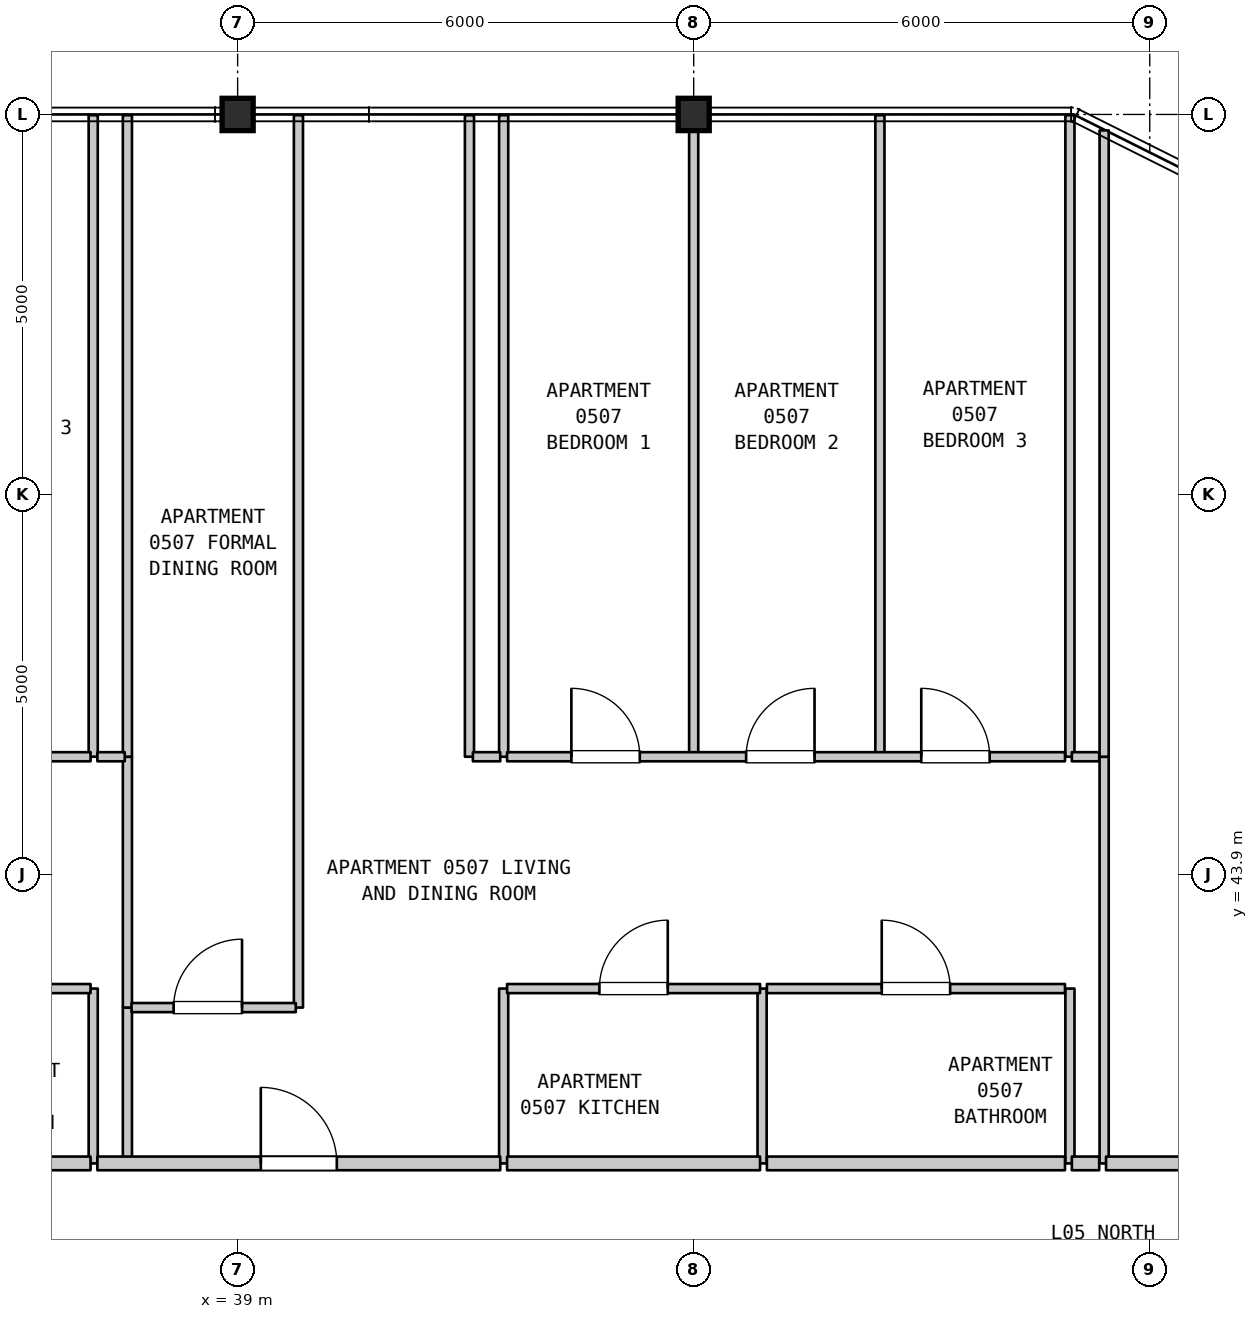
"""IFC4 building model, lengths in metres.
Left out: names, types, materials, properties, quantities, classifications, styles, units other than length and angle.
Written with IfcOpenShell. Run it as: python <this file> out.ifc"""

import sys

from ifc_helpers import new_model, si_unit, direction, frame, frame_2d, origin, origin_2d, place, context, subcontext, project, spatial, rectangle, i_section, extrude, element, fill, save


model = new_model("IFC4")
c1 = context("Model", 3, precision=1e-05, world=origin(), true_north=direction((0.0, 1.0)))
c2 = subcontext(c1, "Body", "Model", "MODEL_VIEW")
j1 = project(units=[si_unit("LENGTHUNIT", "METRE"), si_unit("PLANEANGLEUNIT", "RADIAN")], contexts=[c1])
p1 = place(None, origin())
s1 = spatial("IfcSite", under=j1, at=p1, CompositionType="ELEMENT")
p2 = place(p1, origin())
s2 = spatial("IfcBuilding", under=s1, at=p2, CompositionType="ELEMENT")
p3 = place(p2, frame((0.0, 0.0, 27.7)))
s3 = spatial("IfcBuildingStorey", under=s2, at=p3, CompositionType="ELEMENT", Elevation=27.7)
for number, where, z_axis, x_axis in (
    (1, (39.0, 53.9, 0.0), (0.0, 0.0, 1.0), (1.0, 0.0, 0.0)),
    (2, (45.0, 53.9, 0.0), (0.0, 0.0, 1.0), (1.0, 0.0, 0.0)),
):
    element("IfcColumn", number, at=place(p3, frame(where, z_axis=z_axis, x_axis=x_axis)), inside=s3, PredefinedType="COLUMN", context=c2, shape_type="SweptSolid", body=[
        extrude(i_section(OverallWidth=0.409, OverallDepth=0.425, WebThickness=0.032, FlangeThickness=0.052, FilletRadius=0.015, at=origin_2d()), origin(), (0.0, 0.0, 1.0), 3.7),
    ])
p4 = place(p3, frame((37.1, 40.1, 0.0), z_axis=(0.0, 0.0, 1.0), x_axis=(0.0, 1.0, 0.0)))
e3 = element("IfcWall", 3, at=p4, inside=s3, PredefinedType="PARTITIONING", context=c2, shape_type="SweptSolid", body=[
    extrude(rectangle(XDim=2.3, YDim=0.12, at=frame_2d((1.15, 0.0))), origin(), (0.0, 0.0, 1.0), 3.385),
])
p5 = place(p3, frame((37.1, 45.45, 0.0), z_axis=(0.0, 0.0, 1.0), x_axis=(0.0, 1.0, 0.0)))
e4 = element("IfcWall", 4, at=p5, inside=s3, PredefinedType="PARTITIONING", context=c2, shape_type="SweptSolid", body=[
    extrude(rectangle(XDim=8.44, YDim=0.12, at=frame_2d((4.22, 0.0))), origin(), (0.0, 0.0, 1.0), 3.385),
])
p6 = place(p3, frame((37.55, 40.1, 0.0), z_axis=(0.0, 0.0, 1.0), x_axis=(0.0, 1.0, 0.0)))
e5 = element("IfcWall", 5, at=p6, inside=s3, PredefinedType="PARTITIONING", context=c2, shape_type="SweptSolid", body=[
    extrude(rectangle(XDim=2.05, YDim=0.12, at=frame_2d((1.025, 0.0))), origin(), (0.0, 0.0, 1.0), 3.385),
])
p7 = place(p3, frame((37.55, 42.15, 0.0), z_axis=(0.0, 0.0, 1.0), x_axis=(0.0, 1.0, 0.0)))
e6 = element("IfcWall", 6, at=p7, inside=s3, PredefinedType="PARTITIONING", context=c2, shape_type="SweptSolid", body=[
    extrude(rectangle(XDim=3.3, YDim=0.12, at=frame_2d((1.65, 0.0))), origin(), (0.0, 0.0, 1.0), 3.385),
])
p8 = place(p3, frame((37.55, 45.45, 0.0), z_axis=(0.0, 0.0, 1.0), x_axis=(0.0, 1.0, 0.0)))
e7 = element("IfcWall", 7, at=p8, inside=s3, PredefinedType="PARTITIONING", context=c2, shape_type="SweptSolid", body=[
    extrude(rectangle(XDim=8.44, YDim=0.12, at=frame_2d((4.22, 0.0))), origin(), (0.0, 0.0, 1.0), 3.385),
])
p9 = place(p3, frame((39.8, 42.15, 0.0), z_axis=(0.0, 0.0, 1.0), x_axis=(0.0, 1.0, 0.0)))
e8 = element("IfcWall", 8, at=p9, inside=s3, PredefinedType="PARTITIONING", context=c2, shape_type="SweptSolid", body=[
    extrude(rectangle(XDim=11.74, YDim=0.12, at=frame_2d((5.87, 0.0))), origin(), (0.0, 0.0, 1.0), 3.385),
])
p10 = place(p3, frame((42.05, 45.45, 0.0), z_axis=(0.0, 0.0, 1.0), x_axis=(0.0, 1.0, 0.0)))
e9 = element("IfcWall", 9, at=p10, inside=s3, PredefinedType="PARTITIONING", context=c2, shape_type="SweptSolid", body=[
    extrude(rectangle(XDim=8.44, YDim=0.12, at=frame_2d((4.22, 0.0))), origin(), (0.0, 0.0, 1.0), 3.385),
])
p11 = place(p3, frame((42.5, 40.1, 0.0), z_axis=(0.0, 0.0, 1.0), x_axis=(0.0, 1.0, 0.0)))
e10 = element("IfcWall", 10, at=p11, inside=s3, PredefinedType="PARTITIONING", context=c2, shape_type="SweptSolid", body=[
    extrude(rectangle(XDim=2.3, YDim=0.12, at=frame_2d((1.15, 0.0))), origin(), (0.0, 0.0, 1.0), 3.385),
])
for number, where, z_axis, x_axis in (
    (11, (42.5, 45.45, 0.0), (0.0, 0.0, 1.0), (0.0, 1.0, 0.0)),
    (12, (45.0, 45.45, 0.0), (0.0, 0.0, 1.0), (0.0, 1.0, 0.0)),
):
    element("IfcWall", number, at=place(p3, frame(where, z_axis=z_axis, x_axis=x_axis)), inside=s3, PredefinedType="PARTITIONING", context=c2, shape_type="SweptSolid", body=[
        extrude(rectangle(XDim=8.44, YDim=0.12, at=frame_2d((4.22, 0.0))), origin(), (0.0, 0.0, 1.0), 3.385),
    ])
p12 = place(p3, frame((45.9, 40.1, 0.0), z_axis=(0.0, 0.0, 1.0), x_axis=(0.0, 1.0, 0.0)))
e13 = element("IfcWall", 13, at=p12, inside=s3, PredefinedType="PARTITIONING", context=c2, shape_type="SweptSolid", body=[
    extrude(rectangle(XDim=2.3, YDim=0.12, at=frame_2d((1.15, 0.0))), origin(), (0.0, 0.0, 1.0), 3.385),
])
p13 = place(p3, frame((47.45, 45.45, 0.0), z_axis=(0.0, 0.0, 1.0), x_axis=(0.0, 1.0, 0.0)))
e14 = element("IfcWall", 14, at=p13, inside=s3, PredefinedType="PARTITIONING", context=c2, shape_type="SweptSolid", body=[
    extrude(rectangle(XDim=8.44, YDim=0.12, at=frame_2d((4.22, 0.0))), origin(), (0.0, 0.0, 1.0), 3.385),
])
p14 = place(p3, frame((49.95, 40.1, 0.0), z_axis=(0.0, 0.0, 1.0), x_axis=(0.0, 1.0, 0.0)))
e15 = element("IfcWall", 15, at=p14, inside=s3, PredefinedType="PARTITIONING", context=c2, shape_type="SweptSolid", body=[
    extrude(rectangle(XDim=2.3, YDim=0.12, at=frame_2d((1.15, 0.0))), origin(), (0.0, 0.0, 1.0), 3.385),
])
p15 = place(p3, frame((49.95, 45.45, 0.0), z_axis=(0.0, 0.0, 1.0), x_axis=(0.0, 1.0, 0.0)))
e16 = element("IfcWall", 16, at=p15, inside=s3, PredefinedType="PARTITIONING", context=c2, shape_type="SweptSolid", body=[
    extrude(rectangle(XDim=8.44, YDim=0.12, at=frame_2d((4.22, 0.0))), origin(), (0.0, 0.0, 1.0), 3.385),
])
p16 = place(p3, frame((50.4, 40.1, 0.0), z_axis=(0.0, 0.0, 1.0), x_axis=(0.0, 1.0, 0.0)))
e17 = element("IfcWall", 17, at=p16, inside=s3, PredefinedType="PARTITIONING", context=c2, shape_type="SweptSolid", body=[
    extrude(rectangle(XDim=5.35, YDim=0.12, at=frame_2d((2.675, 0.0))), origin(), (0.0, 0.0, 1.0), 3.385),
])
p17 = place(p3, frame((50.4, 45.45, 0.0), z_axis=(0.0, 0.0, 1.0), x_axis=(0.0, 1.0, 0.0)))
e18 = element("IfcWall", 18, at=p17, inside=s3, PredefinedType="PARTITIONING", context=c2, shape_type="SweptSolid", body=[
    extrude(rectangle(XDim=8.24, YDim=0.12, at=frame_2d((4.12, 0.0))), origin(), (0.0, 0.0, 1.0), 3.385),
])
p18 = place(p3, frame((34.873, 40.1, 0.0), z_axis=(0.0, 0.0, 1.0), x_axis=(1.0, 0.0, 0.0)))
e19 = element("IfcWall", 19, at=p18, inside=s3, PredefinedType="STANDARD", context=c2, shape_type="SweptSolid", body=[
    extrude(rectangle(XDim=2.192, YDim=0.18, at=frame_2d((1.096, 0.0))), origin(), (0.0, 0.0, 1.0), 3.385),
])
p19 = place(p3, frame((37.155, 40.1, 0.0), z_axis=(0.0, 0.0, 1.0), x_axis=(1.0, 0.0, 0.0)))
e20 = element("IfcWall", 20, at=p19, inside=s3, PredefinedType="STANDARD", context=c2, shape_type="SweptSolid", body=[
    extrude(rectangle(XDim=5.3, YDim=0.18, at=frame_2d((2.65, 0.0))), origin(), (0.0, 0.0, 1.0), 3.385),
])
p20 = place(p19, frame((2.15, 0.0, 0.0)))
e21 = element("IfcOpeningElement", 21, at=p20, cuts=e20, PredefinedType="OPENING", context=c2, shape_type="SweptSolid", body=[
    extrude(rectangle(XDim=1.0, YDim=2.15, at=frame_2d((0.5, 1.075))), frame((0.0, 0.1, 0.0), z_axis=(0.0, -1.0, 0.0), x_axis=(1.0, 0.0, 0.0)), (0.0, 0.0, 1.0), 0.2),
])
p21 = place(p3, frame((42.545, 40.1, 0.0), z_axis=(0.0, 0.0, 1.0), x_axis=(1.0, 0.0, 0.0)))
e22 = element("IfcWall", 22, at=p21, inside=s3, PredefinedType="STANDARD", context=c2, shape_type="SweptSolid", body=[
    extrude(rectangle(XDim=3.328, YDim=0.18, at=frame_2d((1.664, 0.0))), origin(), (0.0, 0.0, 1.0), 3.385),
])
p22 = place(p3, frame((45.963, 40.1, 0.0), z_axis=(0.0, 0.0, 1.0), x_axis=(1.0, 0.0, 0.0)))
e23 = element("IfcWall", 23, at=p22, inside=s3, PredefinedType="STANDARD", context=c2, shape_type="SweptSolid", body=[
    extrude(rectangle(XDim=3.922, YDim=0.18, at=frame_2d((1.961, 0.0))), origin(), (0.0, 0.0, 1.0), 3.385),
])
p23 = place(p3, frame((49.975, 40.1, 0.0), z_axis=(0.0, 0.0, 1.0), x_axis=(1.0, 0.0, 0.0)))
e24 = element("IfcWall", 24, at=p23, inside=s3, PredefinedType="STANDARD", context=c2, shape_type="SweptSolid", body=[
    extrude(rectangle(XDim=0.36, YDim=0.18, at=frame_2d((0.18, 0.0))), origin(), (0.0, 0.0, 1.0), 3.385),
])
p24 = place(p3, frame((50.425, 40.1, 0.0), z_axis=(0.0, 0.0, 1.0), x_axis=(1.0, 0.0, 0.0)))
e25 = element("IfcWall", 25, at=p24, inside=s3, PredefinedType="STANDARD", context=c2, shape_type="SweptSolid", body=[
    extrude(rectangle(XDim=4.03, YDim=0.18, at=frame_2d((2.015, 0.0))), origin(), (0.0, 0.0, 1.0), 3.385),
])
p25 = place(p24, frame((1.515, 0.0, 0.0)))
e26 = element("IfcOpeningElement", 26, at=p25, cuts=e25, PredefinedType="OPENING", context=c2, shape_type="SweptSolid", body=[
    extrude(rectangle(XDim=1.0, YDim=2.15, at=frame_2d((0.5, 1.075))), frame((0.0, 0.1, 0.0), z_axis=(0.0, -1.0, 0.0), x_axis=(1.0, 0.0, 0.0)), (0.0, 0.0, 1.0), 0.2),
])
p26 = place(p3, frame((37.605, 42.15, 0.0), z_axis=(0.0, 0.0, 1.0), x_axis=(1.0, 0.0, 0.0)))
e27 = element("IfcWall", 27, at=p26, inside=s3, PredefinedType="PARTITIONING", context=c2, shape_type="SweptSolid", body=[
    extrude(rectangle(XDim=2.16, YDim=0.12, at=frame_2d((1.08, 0.0))), origin(), (0.0, 0.0, 1.0), 3.385),
])
p27 = place(p26, frame((0.553, 0.0, 0.0)))
e28 = element("IfcOpeningElement", 28, at=p27, cuts=e27, PredefinedType="OPENING", context=c2, shape_type="SweptSolid", body=[
    extrude(rectangle(XDim=0.9, YDim=2.15, at=frame_2d((0.45, 1.075))), frame((0.0, 0.07, 0.0), z_axis=(0.0, -1.0, 0.0), x_axis=(1.0, 0.0, 0.0)), (0.0, 0.0, 1.0), 0.14),
])
p28 = place(p3, frame((34.873, 42.4, 0.0), z_axis=(0.0, 0.0, 1.0), x_axis=(1.0, 0.0, 0.0)))
e29 = element("IfcWall", 29, at=p28, inside=s3, PredefinedType="PARTITIONING", context=c2, shape_type="SweptSolid", body=[
    extrude(rectangle(XDim=2.192, YDim=0.12, at=frame_2d((1.096, 0.0))), origin(), (0.0, 0.0, 1.0), 3.385),
])
p29 = place(p28, frame((0.646, 0.0, 0.0)))
e30 = element("IfcOpeningElement", 30, at=p29, cuts=e29, PredefinedType="OPENING", context=c2, shape_type="SweptSolid", body=[
    extrude(rectangle(XDim=0.9, YDim=2.1, at=frame_2d((0.45, 1.05))), frame((0.0, 0.07, 0.0), z_axis=(0.0, -1.0, 0.0), x_axis=(1.0, 0.0, 0.0)), (0.0, 0.0, 1.0), 0.14),
])
p30 = place(p3, frame((42.545, 42.4, 0.0), z_axis=(0.0, 0.0, 1.0), x_axis=(1.0, 0.0, 0.0)))
e31 = element("IfcWall", 31, at=p30, inside=s3, PredefinedType="PARTITIONING", context=c2, shape_type="SweptSolid", body=[
    extrude(rectangle(XDim=3.328, YDim=0.12, at=frame_2d((1.664, 0.0))), origin(), (0.0, 0.0, 1.0), 3.385),
])
p31 = place(p30, frame((1.214, 0.0, 0.0)))
e32 = element("IfcOpeningElement", 32, at=p31, cuts=e31, PredefinedType="OPENING", context=c2, shape_type="SweptSolid", body=[
    extrude(rectangle(XDim=0.9, YDim=2.15, at=frame_2d((0.45, 1.075))), frame((0.0, 0.07, 0.0), z_axis=(0.0, -1.0, 0.0), x_axis=(1.0, 0.0, 0.0)), (0.0, 0.0, 1.0), 0.14),
])
p32 = place(p3, frame((45.963, 42.4, 0.0), z_axis=(0.0, 0.0, 1.0), x_axis=(1.0, 0.0, 0.0)))
e33 = element("IfcWall", 33, at=p32, inside=s3, PredefinedType="PARTITIONING", context=c2, shape_type="SweptSolid", body=[
    extrude(rectangle(XDim=3.922, YDim=0.12, at=frame_2d((1.961, 0.0))), origin(), (0.0, 0.0, 1.0), 3.385),
])
p33 = place(p32, frame((1.511, 0.0, 0.0)))
e34 = element("IfcOpeningElement", 34, at=p33, cuts=e33, PredefinedType="OPENING", context=c2, shape_type="SweptSolid", body=[
    extrude(rectangle(XDim=0.9, YDim=2.1, at=frame_2d((0.45, 1.05))), frame((0.0, 0.07, 0.0), z_axis=(0.0, -1.0, 0.0), x_axis=(1.0, 0.0, 0.0)), (0.0, 0.0, 1.0), 0.14),
])
p34 = place(p3, frame((29.005, 45.45, 0.0), z_axis=(0.0, 0.0, 1.0), x_axis=(1.0, 0.0, 0.0)))
e35 = element("IfcWall", 35, at=p34, inside=s3, PredefinedType="PARTITIONING", context=c2, shape_type="SweptSolid", body=[
    extrude(rectangle(XDim=8.06, YDim=0.12, at=frame_2d((4.03, 0.0))), origin(), (0.0, 0.0, 1.0), 3.385),
])
p35 = place(p34, frame((0.968, 0.0, 0.0)))
e36 = element("IfcOpeningElement", 36, at=p35, cuts=e35, PredefinedType="OPENING", context=c2, shape_type="SweptSolid", body=[
    extrude(rectangle(XDim=0.9, YDim=2.15, at=frame_2d((0.45, 1.075))), frame((0.0, 0.07, 0.0), z_axis=(0.0, -1.0, 0.0), x_axis=(1.0, 0.0, 0.0)), (0.0, 0.0, 1.0), 0.14),
])
p36 = place(p34, frame((3.507, 0.0, 0.0)))
e37 = element("IfcOpeningElement", 37, at=p36, cuts=e35, PredefinedType="OPENING", context=c2, shape_type="SweptSolid", body=[
    extrude(rectangle(XDim=0.9, YDim=2.15, at=frame_2d((0.45, 1.075))), frame((0.0, 0.07, 0.0), z_axis=(0.0, -1.0, 0.0), x_axis=(1.0, 0.0, 0.0)), (0.0, 0.0, 1.0), 0.14),
])
p37 = place(p34, frame((6.051, 0.0, 0.0)))
e38 = element("IfcOpeningElement", 38, at=p37, cuts=e35, PredefinedType="OPENING", context=c2, shape_type="SweptSolid", body=[
    extrude(rectangle(XDim=0.9, YDim=2.15, at=frame_2d((0.45, 1.075))), frame((0.0, 0.07, 0.0), z_axis=(0.0, -1.0, 0.0), x_axis=(1.0, 0.0, 0.0)), (0.0, 0.0, 1.0), 0.14),
])
p38 = place(p3, frame((37.155, 45.45, 0.0), z_axis=(0.0, 0.0, 1.0), x_axis=(1.0, 0.0, 0.0)))
e39 = element("IfcWall", 39, at=p38, inside=s3, PredefinedType="PARTITIONING", context=c2, shape_type="SweptSolid", body=[
    extrude(rectangle(XDim=0.36, YDim=0.12, at=frame_2d((0.18, 0.0))), origin(), (0.0, 0.0, 1.0), 3.385),
])
p39 = place(p3, frame((42.095, 45.45, 0.0), z_axis=(0.0, 0.0, 1.0), x_axis=(1.0, 0.0, 0.0)))
e40 = element("IfcWall", 40, at=p39, inside=s3, PredefinedType="PARTITIONING", context=c2, shape_type="SweptSolid", body=[
    extrude(rectangle(XDim=0.36, YDim=0.12, at=frame_2d((0.18, 0.0))), origin(), (0.0, 0.0, 1.0), 3.385),
])
p40 = place(p3, frame((42.545, 45.45, 0.0), z_axis=(0.0, 0.0, 1.0), x_axis=(1.0, 0.0, 0.0)))
e41 = element("IfcWall", 41, at=p40, inside=s3, PredefinedType="PARTITIONING", context=c2, shape_type="SweptSolid", body=[
    extrude(rectangle(XDim=7.34, YDim=0.12, at=frame_2d((3.67, 0.0))), origin(), (0.0, 0.0, 1.0), 3.385),
])
p41 = place(p40, frame((0.846, 0.0, 0.0)))
e42 = element("IfcOpeningElement", 42, at=p41, cuts=e41, PredefinedType="OPENING", context=c2, shape_type="SweptSolid", body=[
    extrude(rectangle(XDim=0.9, YDim=2.15, at=frame_2d((0.45, 1.075))), frame((0.0, 0.07, 0.0), z_axis=(0.0, -1.0, 0.0), x_axis=(1.0, 0.0, 0.0)), (0.0, 0.0, 1.0), 0.14),
])
p42 = place(p40, frame((3.145, 0.0, 0.0)))
e43 = element("IfcOpeningElement", 43, at=p42, cuts=e41, PredefinedType="OPENING", context=c2, shape_type="SweptSolid", body=[
    extrude(rectangle(XDim=0.9, YDim=2.15, at=frame_2d((0.45, 1.075))), frame((0.0, 0.07, 0.0), z_axis=(0.0, -1.0, 0.0), x_axis=(1.0, 0.0, 0.0)), (0.0, 0.0, 1.0), 0.14),
])
p43 = place(p40, frame((5.449, 0.0, 0.0)))
e44 = element("IfcOpeningElement", 44, at=p43, cuts=e41, PredefinedType="OPENING", context=c2, shape_type="SweptSolid", body=[
    extrude(rectangle(XDim=0.9, YDim=2.15, at=frame_2d((0.45, 1.075))), frame((0.0, 0.07, 0.0), z_axis=(0.0, -1.0, 0.0), x_axis=(1.0, 0.0, 0.0)), (0.0, 0.0, 1.0), 0.14),
])
p44 = place(p3, frame((49.975, 45.45, 0.0), z_axis=(0.0, 0.0, 1.0), x_axis=(1.0, 0.0, 0.0)))
e45 = element("IfcWall", 45, at=p44, inside=s3, PredefinedType="PARTITIONING", context=c2, shape_type="SweptSolid", body=[
    extrude(rectangle(XDim=0.36, YDim=0.12, at=frame_2d((0.18, 0.0))), origin(), (0.0, 0.0, 1.0), 3.385),
])
p45 = place(p20, origin())
e46 = element("IfcDoor", 46, at=p45, inside=s3, OperationType="SINGLE_SWING_LEFT", PredefinedType="DOOR", context=c2, shape_type="SweptSolid", body=[
    extrude(rectangle(XDim=1.0, YDim=2.15, at=frame_2d((0.5, 1.075))), frame((0.0, 0.025, 0.0), z_axis=(0.0, -1.0, 0.0), x_axis=(1.0, 0.0, 0.0)), (0.0, 0.0, 1.0), 0.05),
])
fill(e21, e46)
p46 = place(p27, origin())
e47 = element("IfcDoor", 47, at=p46, inside=s3, OperationType="SINGLE_SWING_RIGHT", PredefinedType="DOOR", context=c2, shape_type="SweptSolid", body=[
    extrude(rectangle(XDim=0.9, YDim=2.15, at=frame_2d((0.45, 1.075))), frame((0.0, 0.025, 0.0), z_axis=(0.0, -1.0, 0.0), x_axis=(1.0, 0.0, 0.0)), (0.0, 0.0, 1.0), 0.05),
])
fill(e28, e47)
p47 = place(p31, origin())
e48 = element("IfcDoor", 48, at=p47, inside=s3, OperationType="SINGLE_SWING_RIGHT", PredefinedType="DOOR", context=c2, shape_type="SweptSolid", body=[
    extrude(rectangle(XDim=0.9, YDim=2.15, at=frame_2d((0.45, 1.075))), frame((0.0, 0.025, 0.0), z_axis=(0.0, -1.0, 0.0), x_axis=(1.0, 0.0, 0.0)), (0.0, 0.0, 1.0), 0.05),
])
fill(e32, e48)
p48 = place(p33, origin())
e49 = element("IfcDoor", 49, at=p48, inside=s3, OperationType="SINGLE_SWING_LEFT", PredefinedType="DOOR", context=c2, shape_type="SweptSolid", body=[
    extrude(rectangle(XDim=0.9, YDim=2.1, at=frame_2d((0.45, 1.05))), frame((0.0, 0.025, 0.0), z_axis=(0.0, -1.0, 0.0), x_axis=(1.0, 0.0, 0.0)), (0.0, 0.0, 1.0), 0.05),
])
fill(e34, e49)
p49 = place(p41, origin())
e50 = element("IfcDoor", 50, at=p49, inside=s3, OperationType="SINGLE_SWING_LEFT", PredefinedType="DOOR", context=c2, shape_type="SweptSolid", body=[
    extrude(rectangle(XDim=0.9, YDim=2.15, at=frame_2d((0.45, 1.075))), frame((0.0, 0.025, 0.0), z_axis=(0.0, -1.0, 0.0), x_axis=(1.0, 0.0, 0.0)), (0.0, 0.0, 1.0), 0.05),
])
fill(e42, e50)
p50 = place(p42, origin())
e51 = element("IfcDoor", 51, at=p50, inside=s3, OperationType="SINGLE_SWING_RIGHT", PredefinedType="DOOR", context=c2, shape_type="SweptSolid", body=[
    extrude(rectangle(XDim=0.9, YDim=2.15, at=frame_2d((0.45, 1.075))), frame((0.0, 0.025, 0.0), z_axis=(0.0, -1.0, 0.0), x_axis=(1.0, 0.0, 0.0)), (0.0, 0.0, 1.0), 0.05),
])
fill(e43, e51)
p51 = place(p43, origin())
e52 = element("IfcDoor", 52, at=p51, inside=s3, OperationType="SINGLE_SWING_LEFT", PredefinedType="DOOR", context=c2, shape_type="SweptSolid", body=[
    extrude(rectangle(XDim=0.9, YDim=2.15, at=frame_2d((0.45, 1.075))), frame((0.0, 0.025, 0.0), z_axis=(0.0, -1.0, 0.0), x_axis=(1.0, 0.0, 0.0)), (0.0, 0.0, 1.0), 0.05),
])
fill(e44, e52)
save(model, sys.argv[1])
